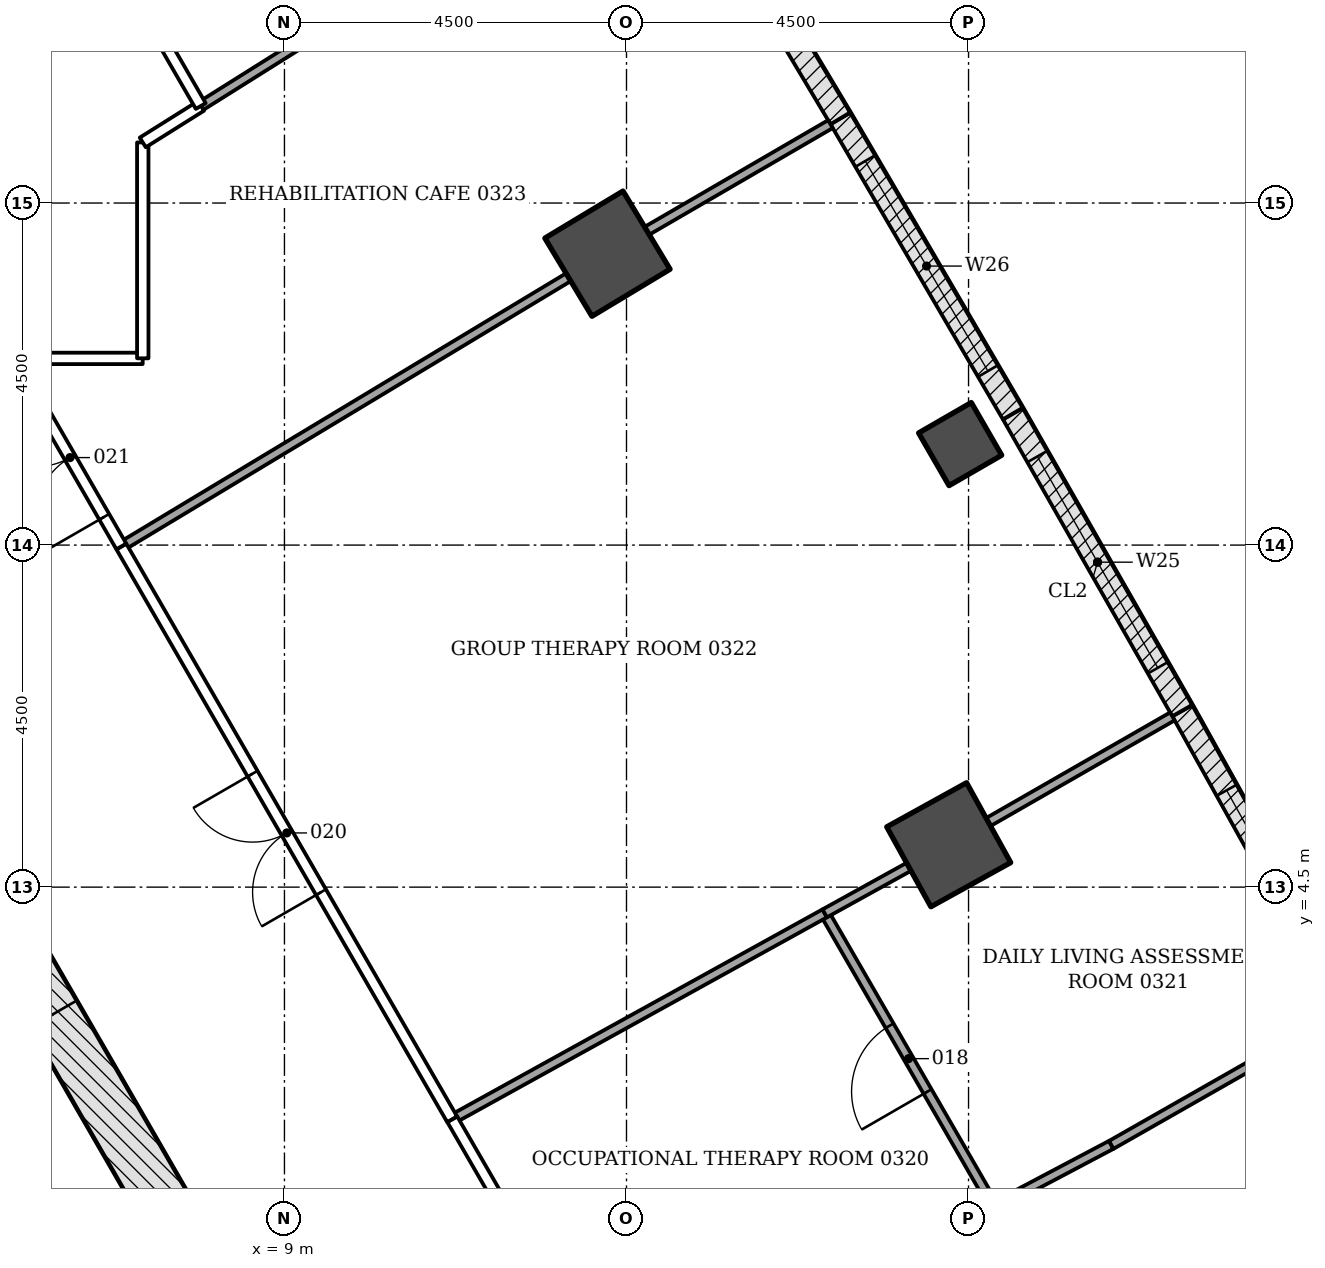
"""IFC4 building model, lengths in metres.
Left out: names, types, materials, properties, quantities, classifications, styles, units other than length and angle.
Written with IfcOpenShell. Run it as: python <this file> out.ifc"""

import sys

from ifc_helpers import new_model, si_unit, direction, frame, frame_2d, origin, origin_2d, place, context, subcontext, project, spatial, rectangle, extrude, element, fill, save


model = new_model("IFC4")
c1 = context("Model", 3, precision=1e-05, world=origin(), true_north=direction((0.0, 1.0)))
c2 = subcontext(c1, "Body", "Model", "MODEL_VIEW")
j1 = project(units=[si_unit("LENGTHUNIT", "METRE"), si_unit("PLANEANGLEUNIT", "RADIAN")], contexts=[c1])
p1 = place(None, origin())
s1 = spatial("IfcSite", under=j1, at=p1, CompositionType="ELEMENT")
p2 = place(p1, origin())
s2 = spatial("IfcBuilding", under=s1, at=p2, CompositionType="ELEMENT")
p3 = place(p2, frame((0.0, 0.0, 15.0)))
s3 = spatial("IfcBuildingStorey", under=s2, at=p3, CompositionType="ELEMENT", Elevation=15.0)
for number, where, z_axis, x_axis in (
    (1, (17.739, 5.058, -0.25), (0.0, 0.0, 1.0), (0.875, 0.484, 0.0)),
    (2, (13.25, 12.834, -0.25), (0.0, 0.0, 1.0), (0.857, 0.516, 0.0)),
):
    element("IfcColumn", number, at=place(p3, frame(where, z_axis=z_axis, x_axis=x_axis)), inside=s3, PredefinedType="COLUMN", context=c2, shape_type="SweptSolid", body=[
        extrude(rectangle(XDim=1.2, YDim=1.2, at=origin_2d()), origin(), (0.0, 0.0, 1.0), 4.5),
    ])
p4 = place(p3, frame((17.89, 10.329, -0.25), z_axis=(0.0, 0.0, 1.0), x_axis=(0.866025403784, 0.5, 0.0)))
e3 = element("IfcColumn", 3, at=p4, inside=s3, PredefinedType="COLUMN", context=c2, shape_type="SweptSolid", body=[
    extrude(rectangle(XDim=0.8, YDim=0.8, at=origin_2d()), origin(), (0.0, 0.0, 1.0), 4.5),
])
p5 = place(p3, frame((10.311, -4.703, -0.25), z_axis=(0.0, 0.0, 1.0), x_axis=(-0.500001446645, 0.866024568562, 0.0)))
e4 = element("IfcWall", 4, at=p5, inside=s3, PredefinedType="SHEAR", context=c2, shape_type="SweptSolid", body=[
    extrude(rectangle(XDim=18.458, YDim=0.7, at=frame_2d((9.229, 0.0))), origin(), (0.0, 0.0, 1.0), 4.5),
])
p6 = place(p5, frame((8.7, 0.0, 0.25)))
e5 = element("IfcOpeningElement", 5, at=p6, cuts=e4, PredefinedType="OPENING", context=c2, shape_type="SweptSolid", body=[
    extrude(rectangle(XDim=1.0, YDim=2.1, at=frame_2d((0.5, 1.05))), frame((0.0, 0.36, 0.0), z_axis=(0.0, -1.0, 0.0), x_axis=(1.0, 0.0, 0.0)), (0.0, 0.0, 1.0), 0.72),
])
p7 = place(p5, frame((4.002, 0.0, 0.25)))
e6 = element("IfcOpeningElement", 6, at=p7, cuts=e4, PredefinedType="OPENING", context=c2, shape_type="SweptSolid", body=[
    extrude(rectangle(XDim=0.9, YDim=2.1, at=frame_2d((0.45, 1.05))), frame((0.0, 0.36, 0.0), z_axis=(0.0, -1.0, 0.0), x_axis=(1.0, 0.0, 0.0)), (0.0, 0.0, 1.0), 0.72),
])
p8 = place(p5, frame((14.093, 0.0, 0.25)))
e7 = element("IfcOpeningElement", 7, at=p8, cuts=e4, PredefinedType="OPENING", context=c2, shape_type="SweptSolid", body=[
    extrude(rectangle(XDim=0.9, YDim=2.1, at=frame_2d((0.45, 1.05))), frame((0.0, 0.36, 0.0), z_axis=(0.0, -1.0, 0.0), x_axis=(1.0, 0.0, 0.0)), (0.0, 0.0, 1.0), 0.72),
])
p9 = place(p3, frame((20.812, 6.82, 0.0), z_axis=(0.0, 0.0, 1.0), x_axis=(0.486606252415, -0.873621402617, 0.0)))
e8 = element("IfcWall", 8, at=p9, inside=s3, PredefinedType="NOTDEFINED", context=c2, shape_type="SweptSolid", body=[
    extrude(rectangle(XDim=4.496, YDim=0.3, at=frame_2d((2.248, 0.0))), origin(), (0.0, 0.0, 1.0), 4.25),
])
p10 = place(p9, frame((1.198, 0.0, 0.8)))
e9 = element("IfcOpeningElement", 9, at=p10, cuts=e8, PredefinedType="OPENING", context=c2, shape_type="SweptSolid", body=[
    extrude(rectangle(XDim=2.1, YDim=3.0, at=frame_2d((1.05, 1.5))), frame((0.0, 0.16, 0.0), z_axis=(0.0, -1.0, 0.0), x_axis=(1.0, 0.0, 0.0)), (0.0, 0.0, 1.0), 0.32),
])
p11 = place(p3, frame((18.583, 10.728, 0.0), z_axis=(0.0, 0.0, 1.0), x_axis=(0.495524760411, -0.868593812907, 0.0)))
e10 = element("IfcWall", 10, at=p11, inside=s3, PredefinedType="NOTDEFINED", context=c2, shape_type="SweptSolid", body=[
    extrude(rectangle(XDim=4.496, YDim=0.3, at=frame_2d((2.248, 0.0))), origin(), (0.0, 0.0, 1.0), 4.25),
])
p12 = place(p11, frame((0.648, 0.0, 0.8)))
e11 = element("IfcOpeningElement", 11, at=p12, cuts=e10, PredefinedType="OPENING", context=c2, shape_type="SweptSolid", body=[
    extrude(rectangle(XDim=3.2, YDim=2.7, at=frame_2d((1.6, 1.35))), frame((0.0, 0.16, 0.0), z_axis=(0.0, -1.0, 0.0), x_axis=(1.0, 0.0, 0.0)), (0.0, 0.0, 1.0), 0.32),
])
p13 = place(p3, frame((16.314, 14.612, 0.0), z_axis=(0.0, 0.0, 1.0), x_axis=(0.50445499627, -0.86343798662, 0.0)))
e12 = element("IfcWall", 12, at=p13, inside=s3, PredefinedType="NOTDEFINED", context=c2, shape_type="SweptSolid", body=[
    extrude(rectangle(XDim=4.496, YDim=0.3, at=frame_2d((2.248, 0.0))), origin(), (0.0, 0.0, 1.0), 4.25),
])
p14 = place(p13, frame((0.648, 0.0, 0.8)))
e13 = element("IfcOpeningElement", 13, at=p14, cuts=e12, PredefinedType="OPENING", context=c2, shape_type="SweptSolid", body=[
    extrude(rectangle(XDim=3.2, YDim=2.7, at=frame_2d((1.6, 1.35))), frame((0.0, 0.16, 0.0), z_axis=(0.0, -1.0, 0.0), x_axis=(1.0, 0.0, 0.0)), (0.0, 0.0, 1.0), 0.32),
])
p15 = place(p3, frame((14.005, 18.472, 0.0), z_axis=(0.0, 0.0, 1.0), x_axis=(0.513257465408, -0.858234684805, 0.0)))
e14 = element("IfcWall", 14, at=p15, inside=s3, PredefinedType="NOTDEFINED", context=c2, shape_type="SweptSolid", body=[
    extrude(rectangle(XDim=4.496, YDim=0.3, at=frame_2d((2.248, 0.0))), origin(), (0.0, 0.0, 1.0), 4.25),
])
p16 = place(p15, frame((1.198, 0.0, 0.8)))
e15 = element("IfcOpeningElement", 15, at=p16, cuts=e14, PredefinedType="OPENING", context=c2, shape_type="SweptSolid", body=[
    extrude(rectangle(XDim=2.1, YDim=3.0, at=frame_2d((1.05, 1.5))), frame((0.0, 0.16, 0.0), z_axis=(0.0, -1.0, 0.0), x_axis=(1.0, 0.0, 0.0)), (0.0, 0.0, 1.0), 0.32),
])
p17 = place(p3, frame((21.959, 2.295, 0.0), z_axis=(0.0, 0.0, 1.0), x_axis=(-0.868831589773, -0.49510773435, 0.0)))
e16 = element("IfcWall", 16, at=p17, inside=s3, PredefinedType="PARTITIONING", context=c2, shape_type="SweptSolid", body=[
    extrude(rectangle(XDim=2.397, YDim=0.12, at=frame_2d((1.199, 0.0))), origin(), (0.0, 0.0, 1.0), 3.638),
])
p18 = place(p3, frame((19.875, 1.108, 0.0), z_axis=(0.0, 0.0, 1.0), x_axis=(-0.884094940295, -0.467307325584, 0.0)))
e17 = element("IfcWall", 17, at=p18, inside=s3, PredefinedType="PARTITIONING", context=c2, shape_type="SweptSolid", body=[
    extrude(rectangle(XDim=1.74, YDim=0.12, at=frame_2d((0.87, 0.0))), origin(), (0.0, 0.0, 1.0), 3.638),
])
p19 = place(p3, frame((18.336, 0.295, 0.0), z_axis=(0.0, 0.0, 1.0), x_axis=(-0.499992780121, 0.866029572143, 0.0)))
e18 = element("IfcWall", 18, at=p19, inside=s3, PredefinedType="PARTITIONING", context=c2, shape_type="SweptSolid", body=[
    extrude(rectangle(XDim=4.456, YDim=0.12, at=frame_2d((2.228, 0.0))), origin(), (0.0, 0.0, 1.0), 3.638),
])
p20 = place(p19, frame((1.75, 0.0, 0.0)))
e19 = element("IfcOpeningElement", 19, at=p20, cuts=e18, PredefinedType="OPENING", context=c2, shape_type="SweptSolid", body=[
    extrude(rectangle(XDim=1.0, YDim=2.1, at=frame_2d((0.5, 1.05))), frame((0.0, 0.07, 0.0), z_axis=(0.0, -1.0, 0.0), x_axis=(1.0, 0.0, 0.0)), (0.0, 0.0, 1.0), 0.14),
])
p21 = place(p3, frame((11.208, 1.446, 0.0), z_axis=(0.0, 0.0, 1.0), x_axis=(0.49994237214, -0.866058672688, 0.0)))
e20 = element("IfcWall", 20, at=p21, inside=s3, PredefinedType="PARTITIONING", context=c2, shape_type="SweptSolid", body=[
    extrude(rectangle(XDim=4.356, YDim=0.15, at=frame_2d((2.178, 0.0))), origin(), (0.0, 0.0, 1.0), 3.638),
])
p22 = place(p21, frame((1.65, 0.0, 0.0)))
e21 = element("IfcOpeningElement", 21, at=p22, cuts=e20, PredefinedType="OPENING", context=c2, shape_type="SweptSolid", body=[
    extrude(rectangle(XDim=1.0, YDim=2.1, at=frame_2d((0.5, 1.05))), frame((0.0, 0.085, 0.0), z_axis=(0.0, -1.0, 0.0), x_axis=(1.0, 0.0, 0.0)), (0.0, 0.0, 1.0), 0.17),
])
p23 = place(p3, frame((16.108, 4.155, 0.0), z_axis=(0.0, 0.0, 1.0), x_axis=(-0.87515505143, -0.483842573526, 0.0)))
e22 = element("IfcWall", 22, at=p23, inside=s3, PredefinedType="PARTITIONING", context=c2, shape_type="SweptSolid", body=[
    extrude(rectangle(XDim=5.599, YDim=0.12, at=frame_2d((2.799, 0.0))), origin(), (0.0, 0.0, 1.0), 3.638),
])
p24 = place(p3, frame((17.214, 4.767, 0.0), z_axis=(0.0, 0.0, 1.0), x_axis=(-0.874994011196, -0.484133742235, 0.0)))
e23 = element("IfcWall", 23, at=p24, inside=s3, PredefinedType="PARTITIONING", context=c2, shape_type="SweptSolid", body=[
    extrude(rectangle(XDim=1.264, YDim=0.12, at=frame_2d((0.632, 0.0))), origin(), (0.0, 0.0, 1.0), 3.638),
])
p25 = place(p3, frame((20.682, 6.746, 0.0), z_axis=(0.0, 0.0, 1.0), x_axis=(-0.867283853893, -0.49781393791, 0.0)))
e24 = element("IfcWall", 24, at=p25, inside=s3, PredefinedType="PARTITIONING", context=c2, shape_type="SweptSolid", body=[
    extrude(rectangle(XDim=2.792, YDim=0.12, at=frame_2d((1.396, 0.0))), origin(), (0.0, 0.0, 1.0), 3.633),
])
p26 = place(p3, frame((11.206, 1.446, 0.0), z_axis=(0.0, 0.0, 1.0), x_axis=(-0.500116761363, 0.865957981085, 0.0)))
e25 = element("IfcWall", 25, at=p26, inside=s3, PredefinedType="PARTITIONING", context=c2, shape_type="SweptSolid", body=[
    extrude(rectangle(XDim=8.7, YDim=0.15, at=frame_2d((4.35, 0.0))), origin(), (0.0, 0.0, 1.0), 3.638),
])
p27 = place(p26, frame((3.45, 0.0, 0.0)))
e26 = element("IfcOpeningElement", 26, at=p27, cuts=e25, PredefinedType="OPENING", context=c2, shape_type="SweptSolid", body=[
    extrude(rectangle(XDim=1.8, YDim=2.1, at=frame_2d((0.9, 1.05))), frame((0.0, 0.085, 0.0), z_axis=(0.0, -1.0, 0.0), x_axis=(1.0, 0.0, 0.0)), (0.0, 0.0, 1.0), 0.17),
])
p28 = place(p3, frame((6.854, 8.982, 0.0), z_axis=(0.0, 0.0, 1.0), x_axis=(-0.499919889281, 0.866071650789, 0.0)))
e27 = element("IfcWall", 27, at=p28, inside=s3, PredefinedType="PARTITIONING", context=c2, shape_type="SweptSolid", body=[
    extrude(rectangle(XDim=2.854, YDim=0.15, at=frame_2d((1.427, 0.0))), origin(), (0.0, 0.0, 1.0), 3.638),
])
p29 = place(p28, frame((0.45, 0.0, 0.0)))
e28 = element("IfcOpeningElement", 28, at=p29, cuts=e27, PredefinedType="OPENING", context=c2, shape_type="SweptSolid", body=[
    extrude(rectangle(XDim=1.8, YDim=2.1, at=frame_2d((0.9, 1.05))), frame((0.0, 0.085, 0.0), z_axis=(0.0, -1.0, 0.0), x_axis=(1.0, 0.0, 0.0)), (0.0, 0.0, 1.0), 0.17),
])
p30 = place(p3, frame((5.427, 11.456, 0.0), z_axis=(0.0, 0.0, 1.0), x_axis=(1.0, 0.0, 0.0)))
e29 = element("IfcWall", 29, at=p30, inside=s3, PredefinedType="PARTITIONING", context=c2, shape_type="SweptSolid", body=[
    extrude(rectangle(XDim=1.708, YDim=0.15, at=frame_2d((0.854, 0.0))), origin(), (0.0, 0.0, 1.0), 4.25),
])
p31 = place(p3, frame((7.136, 11.457, 0.0), z_axis=(0.0, 0.0, 1.0), x_axis=(0.0, 1.0, 0.0)))
e30 = element("IfcWall", 30, at=p31, inside=s3, PredefinedType="PARTITIONING", context=c2, shape_type="SweptSolid", body=[
    extrude(rectangle(XDim=2.84, YDim=0.15, at=frame_2d((1.42, 0.0))), origin(), (0.0, 0.0, 1.0), 3.638),
])
p32 = place(p3, frame((7.136, 14.297, 0.0), z_axis=(0.0, 0.0, 1.0), x_axis=(0.846935212822, 0.531696102377, 0.0)))
e31 = element("IfcWall", 31, at=p32, inside=s3, PredefinedType="PARTITIONING", context=c2, shape_type="SweptSolid", body=[
    extrude(rectangle(XDim=0.905, YDim=0.15, at=frame_2d((0.452, 0.0))), origin(), (0.0, 0.0, 1.0), 3.638),
])
p33 = place(p3, frame((7.899, 14.776, 0.0), z_axis=(0.0, 0.0, 1.0), x_axis=(-0.500392307633, 0.865798786359, 0.0)))
e32 = element("IfcWall", 32, at=p33, inside=s3, PredefinedType="PARTITIONING", context=c2, shape_type="SweptSolid", body=[
    extrude(rectangle(XDim=1.525, YDim=0.15, at=frame_2d((0.762, 0.0))), origin(), (0.0, 0.0, 1.0), 3.638),
])
p34 = place(p3, frame((12.736, 12.524, 0.0), z_axis=(0.0, 0.0, 1.0), x_axis=(-0.8565972601, -0.515985594749, 0.0)))
e33 = element("IfcWall", 33, at=p34, inside=s3, PredefinedType="PARTITIONING", context=c2, shape_type="SweptSolid", body=[
    extrude(rectangle(XDim=6.865, YDim=0.12, at=frame_2d((3.432, 0.0))), origin(), (0.0, 0.0, 1.0), 3.638),
])
p35 = place(p3, frame((16.183, 14.538, 0.0), z_axis=(0.0, 0.0, 1.0), x_axis=(-0.864576979504, -0.50250039454, 0.0)))
e34 = element("IfcWall", 34, at=p35, inside=s3, PredefinedType="PARTITIONING", context=c2, shape_type="SweptSolid", body=[
    extrude(rectangle(XDim=2.792, YDim=0.12, at=frame_2d((1.396, 0.0))), origin(), (0.0, 0.0, 1.0), 3.633),
])
p36 = place(p3, frame((10.898, 16.658, 0.0), z_axis=(0.0, 0.0, 1.0), x_axis=(-0.846864700387, -0.531808404634, 0.0)))
e35 = element("IfcWall", 35, at=p36, inside=s3, PredefinedType="PARTITIONING", context=c2, shape_type="SweptSolid", body=[
    extrude(rectangle(XDim=3.539, YDim=0.12, at=frame_2d((1.77, 0.0))), origin(), (0.0, 0.0, 1.0), 3.638),
])
p37 = place(p10, origin())
e36 = element("IfcWindow", 36, at=p37, inside=s3, PartitioningType="DOUBLE_PANEL_HORIZONTAL", PredefinedType="WINDOW", context=c2, shape_type="SweptSolid", body=[
    extrude(rectangle(XDim=2.1, YDim=3.0, at=frame_2d((1.05, 1.5))), frame((0.0, 0.03, 0.0), z_axis=(0.0, -1.0, 0.0), x_axis=(1.0, 0.0, 0.0)), (0.0, 0.0, 1.0), 0.06),
])
fill(e9, e36)
p38 = place(p12, origin())
e37 = element("IfcWindow", 37, at=p38, inside=s3, PartitioningType="TRIPLE_PANEL_VERTICAL", PredefinedType="WINDOW", context=c2, shape_type="SweptSolid", body=[
    extrude(rectangle(XDim=3.2, YDim=2.7, at=frame_2d((1.6, 1.35))), frame((0.0, 0.03, 0.0), z_axis=(0.0, -1.0, 0.0), x_axis=(1.0, 0.0, 0.0)), (0.0, 0.0, 1.0), 0.06),
])
fill(e11, e37)
p39 = place(p14, origin())
e38 = element("IfcWindow", 38, at=p39, inside=s3, PartitioningType="TRIPLE_PANEL_VERTICAL", PredefinedType="WINDOW", context=c2, shape_type="SweptSolid", body=[
    extrude(rectangle(XDim=3.2, YDim=2.7, at=frame_2d((1.6, 1.35))), frame((0.0, 0.03, 0.0), z_axis=(0.0, -1.0, 0.0), x_axis=(1.0, 0.0, 0.0)), (0.0, 0.0, 1.0), 0.06),
])
fill(e13, e38)
p40 = place(p6, origin())
e39 = element("IfcDoor", 39, at=p40, inside=s3, OperationType="SINGLE_SWING_LEFT", PredefinedType="DOOR", context=c2, shape_type="SweptSolid", body=[
    extrude(rectangle(XDim=1.0, YDim=2.1, at=frame_2d((0.5, 1.05))), frame((0.0, 0.075, 0.0), z_axis=(0.0, -1.0, 0.0), x_axis=(1.0, 0.0, 0.0)), (0.0, 0.0, 1.0), 0.15),
])
fill(e5, e39)
p41 = place(p20, origin())
e40 = element("IfcDoor", 40, at=p41, inside=s3, OperationType="SINGLE_SWING_LEFT", PredefinedType="DOOR", context=c2, shape_type="SweptSolid", body=[
    extrude(rectangle(XDim=1.0, YDim=2.1, at=frame_2d((0.5, 1.05))), frame((0.0, 0.025, 0.0), z_axis=(0.0, -1.0, 0.0), x_axis=(1.0, 0.0, 0.0)), (0.0, 0.0, 1.0), 0.05),
])
fill(e19, e40)
p42 = place(p27, origin())
e41 = element("IfcDoor", 41, at=p42, inside=s3, OperationType="DOUBLE_DOOR_SINGLE_SWING", PredefinedType="DOOR", context=c2, shape_type="SweptSolid", body=[
    extrude(rectangle(XDim=1.8, YDim=2.1, at=frame_2d((0.9, 1.05))), frame((0.0, 0.025, 0.0), z_axis=(0.0, -1.0, 0.0), x_axis=(1.0, 0.0, 0.0)), (0.0, 0.0, 1.0), 0.05),
])
fill(e26, e41)
p43 = place(p29, origin())
e42 = element("IfcDoor", 42, at=p43, inside=s3, OperationType="DOUBLE_DOOR_SINGLE_SWING", PredefinedType="DOOR", context=c2, shape_type="SweptSolid", body=[
    extrude(rectangle(XDim=1.8, YDim=2.1, at=frame_2d((0.9, 1.05))), frame((0.0, 0.025, 0.0), z_axis=(0.0, -1.0, 0.0), x_axis=(1.0, 0.0, 0.0)), (0.0, 0.0, 1.0), 0.05),
])
fill(e28, e42)
save(model, sys.argv[1])
